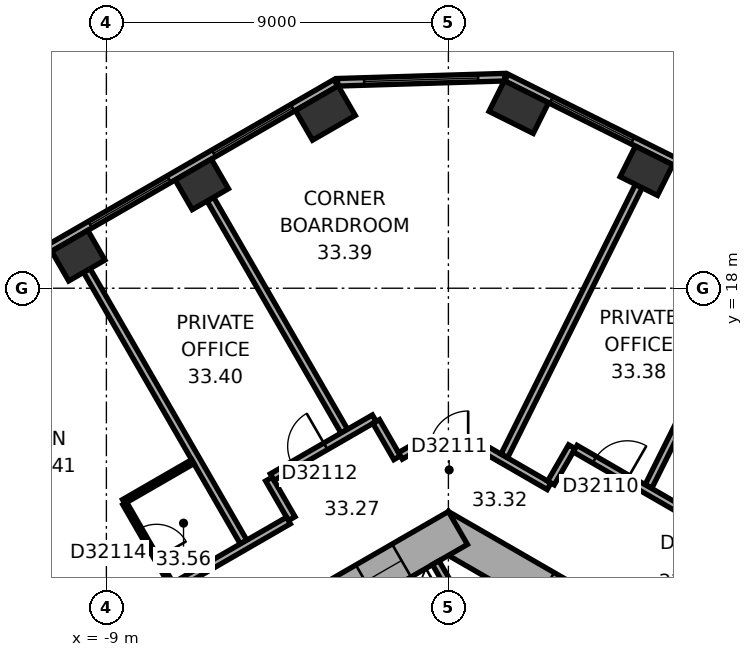
"""IFC4 building model, lengths in metres.
Left out: names, types, materials, properties, quantities, classifications, styles, units other than length and angle.
Written with IfcOpenShell. Run it as: python <this file> out.ifc"""

import sys

from ifc_helpers import new_model, si_unit, direction, frame, frame_2d, origin, origin_2d, place, context, subcontext, project, spatial, rectangle, extrude, element, fill, save


model = new_model("IFC4")
c1 = context("Model", 3, precision=1e-05, world=origin(), true_north=direction((0.0, 1.0)))
c2 = subcontext(c1, "Body", "Model", "MODEL_VIEW")
j1 = project(units=[si_unit("LENGTHUNIT", "METRE"), si_unit("PLANEANGLEUNIT", "RADIAN")], contexts=[c1])
p1 = place(None, origin())
s1 = spatial("IfcSite", under=j1, at=p1, CompositionType="ELEMENT")
p2 = place(p1, origin())
s2 = spatial("IfcBuilding", under=s1, at=p2, CompositionType="ELEMENT")
p3 = place(p2, frame((0.0, 0.0, 135.5)))
s3 = spatial("IfcBuildingStorey", under=s2, at=p3, CompositionType="ELEMENT", Elevation=135.5)
p4 = place(p3, frame((5.211, 21.091, 0.0), z_axis=(0.0, 0.0, 1.0), x_axis=(-0.894934361602, 0.44619781311, 0.0)))
e1 = element("IfcColumn", 1, at=p4, inside=s3, PredefinedType="COLUMN", context=c2, shape_type="SweptSolid", body=[
    extrude(rectangle(XDim=1.1, YDim=0.9, at=origin_2d()), origin(), (0.0, 0.0, 1.0), 3.7),
])
for number, where, z_axis, x_axis in (
    (2, (1.852, 22.766, 0.0), (0.0, 0.0, 1.0), (-0.895, 0.446, 0.0)),
    (3, (-3.238, 22.61, 0.0), (0.0, 0.0, 1.0), (-0.866, -0.5, 0.0)),
):
    element("IfcColumn", number, at=place(p3, frame(where, z_axis=z_axis, x_axis=x_axis)), inside=s3, PredefinedType="COLUMN", context=c2, shape_type="SweptSolid", body=[
        extrude(rectangle(XDim=1.3, YDim=0.9, at=origin_2d()), origin(), (0.0, 0.0, 1.0), 3.7),
    ])
for number, where, z_axis, x_axis in (
    (4, (-6.489, 20.733, 0.0), (0.0, 0.0, 1.0), (-0.866, -0.5, 0.0)),
    (5, (-9.74, 18.856, 0.0), (0.0, 0.0, 1.0), (-0.866, -0.5, 0.0)),
):
    element("IfcColumn", number, at=place(p3, frame(where, z_axis=z_axis, x_axis=x_axis)), inside=s3, PredefinedType="COLUMN", context=c2, shape_type="SweptSolid", body=[
        extrude(rectangle(XDim=1.1, YDim=0.9, at=origin_2d()), origin(), (0.0, 0.0, 1.0), 3.7),
    ])
p5 = place(p3, frame((10.25, 5.629, 0.0), z_axis=(0.0, 0.0, 1.0), x_axis=(-0.866022616891, 0.50000482701, 0.0)))
e6 = element("IfcWall", 6, at=p5, inside=s3, PredefinedType="SHEAR", context=c2, shape_type="SweptSolid", body=[
    extrude(rectangle(XDim=12.125, YDim=1.0, at=frame_2d((6.062, 0.0))), origin(), (0.0, 0.0, 1.0), 3.7),
])
p6 = place(p5, frame((2.612, 0.0, 0.0)))
e7 = element("IfcOpeningElement", 7, at=p6, cuts=e6, PredefinedType="OPENING", context=c2, shape_type="SweptSolid", body=[
    extrude(rectangle(XDim=1.1, YDim=2.1, at=frame_2d((0.55, 1.05))), frame((0.0, 0.51, 0.0), z_axis=(0.0, -1.0, 0.0), x_axis=(1.0, 0.0, 0.0)), (0.0, 0.0, 1.0), 1.02),
])
p7 = place(p5, frame((5.212, 0.0, 0.0)))
e8 = element("IfcOpeningElement", 8, at=p7, cuts=e6, PredefinedType="OPENING", context=c2, shape_type="SweptSolid", body=[
    extrude(rectangle(XDim=1.1, YDim=2.1, at=frame_2d((0.55, 1.05))), frame((0.0, 0.51, 0.0), z_axis=(0.0, -1.0, 0.0), x_axis=(1.0, 0.0, 0.0)), (0.0, 0.0, 1.0), 1.02),
])
p8 = place(p5, frame((7.812, 0.0, 0.0)))
e9 = element("IfcOpeningElement", 9, at=p8, cuts=e6, PredefinedType="OPENING", context=c2, shape_type="SweptSolid", body=[
    extrude(rectangle(XDim=1.1, YDim=2.1, at=frame_2d((0.55, 1.05))), frame((0.0, 0.51, 0.0), z_axis=(0.0, -1.0, 0.0), x_axis=(1.0, 0.0, 0.0)), (0.0, 0.0, 1.0), 1.02),
])
p9 = place(p3, frame((0.25, 11.691, 0.0), z_axis=(0.0, 0.0, 1.0), x_axis=(-0.866022616891, -0.50000482701, 0.0)))
e10 = element("IfcWall", 10, at=p9, inside=s3, PredefinedType="SHEAR", context=c2, shape_type="SweptSolid", body=[
    extrude(rectangle(XDim=12.125, YDim=1.0, at=frame_2d((6.062, 0.0))), origin(), (0.0, 0.0, 1.0), 3.7),
])
p10 = place(p9, frame((6.262, 0.0, 0.0)))
e11 = element("IfcOpeningElement", 11, at=p10, cuts=e10, PredefinedType="OPENING", context=c2, shape_type="SweptSolid", body=[
    extrude(rectangle(XDim=1.5, YDim=2.1, at=frame_2d((0.75, 1.05))), frame((0.0, 0.51, 0.0), z_axis=(0.0, -1.0, 0.0), x_axis=(1.0, 0.0, 0.0)), (0.0, 0.0, 1.0), 1.02),
])
p11 = place(p9, frame((1.712, 0.0, 0.0)))
e12 = element("IfcOpeningElement", 12, at=p11, cuts=e10, PredefinedType="OPENING", context=c2, shape_type="SweptSolid", body=[
    extrude(rectangle(XDim=1.1, YDim=2.1, at=frame_2d((0.55, 1.05))), frame((0.0, 0.51, 0.0), z_axis=(0.0, -1.0, 0.0), x_axis=(1.0, 0.0, 0.0)), (0.0, 0.0, 1.0), 1.02),
])
p12 = place(p3, frame((19.464, 14.599, 0.0), z_axis=(0.0, 0.0, 1.0), x_axis=(-0.894935755043, 0.446195018289, 0.0)))
e13 = element("IfcWall", 13, at=p12, inside=s3, PredefinedType="STANDARD", context=c2, shape_type="SweptSolid", body=[
    extrude(rectangle(XDim=20.044, YDim=0.2, at=frame_2d((10.022, 0.0))), origin(), (0.0, 0.0, 1.0), 3.7),
])
p13 = place(p12, frame((1.313, 0.0, 0.9)))
e14 = element("IfcOpeningElement", 14, at=p13, cuts=e13, PredefinedType="OPENING", context=c2, shape_type="SweptSolid", body=[
    extrude(rectangle(XDim=2.4, YDim=2.0, at=frame_2d((1.2, 1.0))), frame((0.0, 0.11, 0.0), z_axis=(0.0, -1.0, 0.0), x_axis=(1.0, 0.0, 0.0)), (0.0, 0.0, 1.0), 0.22),
])
p14 = place(p12, frame((5.067, 0.0, 0.9)))
e15 = element("IfcOpeningElement", 15, at=p14, cuts=e13, PredefinedType="OPENING", context=c2, shape_type="SweptSolid", body=[
    extrude(rectangle(XDim=2.4, YDim=2.0, at=frame_2d((1.2, 1.0))), frame((0.0, 0.11, 0.0), z_axis=(0.0, -1.0, 0.0), x_axis=(1.0, 0.0, 0.0)), (0.0, 0.0, 1.0), 0.22),
])
p15 = place(p12, frame((8.821, 0.0, 0.9)))
e16 = element("IfcOpeningElement", 16, at=p15, cuts=e13, PredefinedType="OPENING", context=c2, shape_type="SweptSolid", body=[
    extrude(rectangle(XDim=2.4, YDim=2.0, at=frame_2d((1.2, 1.0))), frame((0.0, 0.11, 0.0), z_axis=(0.0, -1.0, 0.0), x_axis=(1.0, 0.0, 0.0)), (0.0, 0.0, 1.0), 0.22),
])
p16 = place(p12, frame((12.575, 0.0, 0.9)))
e17 = element("IfcOpeningElement", 17, at=p16, cuts=e13, PredefinedType="OPENING", context=c2, shape_type="SweptSolid", body=[
    extrude(rectangle(XDim=2.4, YDim=2.0, at=frame_2d((1.2, 1.0))), frame((0.0, 0.11, 0.0), z_axis=(0.0, -1.0, 0.0), x_axis=(1.0, 0.0, 0.0)), (0.0, 0.0, 1.0), 0.22),
])
p17 = place(p12, frame((16.329, 0.0, 0.9)))
e18 = element("IfcOpeningElement", 18, at=p17, cuts=e13, PredefinedType="OPENING", context=c2, shape_type="SweptSolid", body=[
    extrude(rectangle(XDim=2.4, YDim=2.0, at=frame_2d((1.2, 1.0))), frame((0.0, 0.11, 0.0), z_axis=(0.0, -1.0, 0.0), x_axis=(1.0, 0.0, 0.0)), (0.0, 0.0, 1.0), 0.22),
])
p18 = place(p3, frame((1.479, 23.553, 0.0), z_axis=(0.0, 0.0, 1.0), x_axis=(-0.999534786117, -0.03049936625, 0.0)))
e19 = element("IfcWall", 19, at=p18, inside=s3, PredefinedType="STANDARD", context=c2, shape_type="SweptSolid", body=[
    extrude(rectangle(XDim=4.395, YDim=0.2, at=frame_2d((2.197, 0.0))), origin(), (0.0, 0.0, 1.0), 3.7),
])
p19 = place(p18, frame((0.698, 0.0, 0.9)))
e20 = element("IfcOpeningElement", 20, at=p19, cuts=e19, PredefinedType="OPENING", context=c2, shape_type="SweptSolid", body=[
    extrude(rectangle(XDim=3.0, YDim=2.0, at=frame_2d((1.5, 1.0))), frame((0.0, 0.11, 0.0), z_axis=(0.0, -1.0, 0.0), x_axis=(1.0, 0.0, 0.0)), (0.0, 0.0, 1.0), 0.22),
])
p20 = place(p3, frame((-2.961, 23.405, 0.0), z_axis=(0.0, 0.0, 1.0), x_axis=(-0.866023315909, -0.500003616288, 0.0)))
e21 = element("IfcWall", 21, at=p20, inside=s3, PredefinedType="STANDARD", context=c2, shape_type="SweptSolid", body=[
    extrude(rectangle(XDim=20.044, YDim=0.2, at=frame_2d((10.022, 0.0))), origin(), (0.0, 0.0, 1.0), 3.7),
])
p21 = place(p20, frame((1.314, 0.0, 0.9)))
e22 = element("IfcOpeningElement", 22, at=p21, cuts=e21, PredefinedType="OPENING", context=c2, shape_type="SweptSolid", body=[
    extrude(rectangle(XDim=2.4, YDim=2.0, at=frame_2d((1.2, 1.0))), frame((0.0, 0.11, 0.0), z_axis=(0.0, -1.0, 0.0), x_axis=(1.0, 0.0, 0.0)), (0.0, 0.0, 1.0), 0.22),
])
p22 = place(p20, frame((5.069, 0.0, 0.9)))
e23 = element("IfcOpeningElement", 23, at=p22, cuts=e21, PredefinedType="OPENING", context=c2, shape_type="SweptSolid", body=[
    extrude(rectangle(XDim=2.4, YDim=2.0, at=frame_2d((1.2, 1.0))), frame((0.0, 0.11, 0.0), z_axis=(0.0, -1.0, 0.0), x_axis=(1.0, 0.0, 0.0)), (0.0, 0.0, 1.0), 0.22),
])
p23 = place(p20, frame((8.823, 0.0, 0.9)))
e24 = element("IfcOpeningElement", 24, at=p23, cuts=e21, PredefinedType="OPENING", context=c2, shape_type="SweptSolid", body=[
    extrude(rectangle(XDim=2.4, YDim=2.0, at=frame_2d((1.2, 1.0))), frame((0.0, 0.11, 0.0), z_axis=(0.0, -1.0, 0.0), x_axis=(1.0, 0.0, 0.0)), (0.0, 0.0, 1.0), 0.22),
])
p24 = place(p20, frame((12.577, 0.0, 0.9)))
e25 = element("IfcOpeningElement", 25, at=p24, cuts=e21, PredefinedType="OPENING", context=c2, shape_type="SweptSolid", body=[
    extrude(rectangle(XDim=2.4, YDim=2.0, at=frame_2d((1.2, 1.0))), frame((0.0, 0.11, 0.0), z_axis=(0.0, -1.0, 0.0), x_axis=(1.0, 0.0, 0.0)), (0.0, 0.0, 1.0), 0.22),
])
p25 = place(p20, frame((16.331, 0.0, 0.9)))
e26 = element("IfcOpeningElement", 26, at=p25, cuts=e21, PredefinedType="OPENING", context=c2, shape_type="SweptSolid", body=[
    extrude(rectangle(XDim=2.4, YDim=2.0, at=frame_2d((1.2, 1.0))), frame((0.0, 0.11, 0.0), z_axis=(0.0, -1.0, 0.0), x_axis=(1.0, 0.0, 0.0)), (0.0, 0.0, 1.0), 0.22),
])
p26 = place(p3, frame((0.767, 8.872, 0.0), z_axis=(0.0, 0.0, 1.0), x_axis=(-0.499994660107, 0.866028486751, 0.0)))
e27 = element("IfcWall", 27, at=p26, inside=s3, PredefinedType="PARTITIONING", context=c2, shape_type="SweptSolid", body=[
    extrude(rectangle(XDim=2.2, YDim=0.2, at=frame_2d((1.1, 0.0))), origin(), (0.0, 0.0, 1.0), 3.35),
])
p27 = place(p3, frame((-9.515, 18.466, 0.0), z_axis=(0.0, 0.0, 1.0), x_axis=(0.500009360108, -0.866019999656, 0.0)))
e28 = element("IfcWall", 28, at=p27, inside=s3, PredefinedType="PARTITIONING", context=c2, shape_type="SweptSolid", body=[
    extrude(rectangle(XDim=8.25, YDim=0.2, at=frame_2d((4.125, 0.0))), origin(), (0.0, 0.0, 1.0), 2.55),
])
p28 = place(p3, frame((-8.545, 12.387, 0.0), z_axis=(0.0, 0.0, 1.0), x_axis=(0.866009402589, 0.500027713859, 0.0)))
e29 = element("IfcWall", 29, at=p28, inside=s3, PredefinedType="PARTITIONING", context=c2, shape_type="SweptSolid", body=[
    extrude(rectangle(XDim=2.1, YDim=0.12, at=frame_2d((1.05, 0.0))), origin(), (0.0, 0.0, 1.0), 3.35),
])
p29 = place(p3, frame((-7.295, 10.222, 0.0), z_axis=(0.0, 0.0, 1.0), x_axis=(-0.500002508028, 0.866023955769, 0.0)))
e30 = element("IfcWall", 30, at=p29, inside=s3, PredefinedType="PARTITIONING", context=c2, shape_type="SweptSolid", body=[
    extrude(rectangle(XDim=2.44, YDim=0.12, at=frame_2d((1.22, 0.0))), origin(), (0.0, 0.0, 1.0), 3.35),
])
p30 = place(p29, frame((0.77, 0.0, 0.0)))
e31 = element("IfcOpeningElement", 31, at=p30, cuts=e30, PredefinedType="OPENING", context=c2, shape_type="SweptSolid", body=[
    extrude(rectangle(XDim=0.9, YDim=2.1, at=frame_2d((0.45, 1.05))), frame((0.0, 0.07, 0.0), z_axis=(0.0, -1.0, 0.0), x_axis=(1.0, 0.0, 0.0)), (0.0, 0.0, 1.0), 0.14),
])
p31 = place(p3, frame((-6.264, 20.344, 0.0), z_axis=(0.0, 0.0, 1.0), x_axis=(0.500009260695, -0.866020057054, 0.0)))
e32 = element("IfcWall", 32, at=p31, inside=s3, PredefinedType="PARTITIONING", context=c2, shape_type="SweptSolid", body=[
    extrude(rectangle(XDim=7.049, YDim=0.2, at=frame_2d((3.524, 0.0))), origin(), (0.0, 0.0, 1.0), 3.35),
])
p32 = place(p3, frame((-4.723, 12.978, 0.0), z_axis=(0.0, 0.0, 1.0), x_axis=(0.500074377092, -0.865982457891, 0.0)))
e33 = element("IfcWall", 33, at=p32, inside=s3, PredefinedType="PARTITIONING", context=c2, shape_type="SweptSolid", body=[
    extrude(rectangle(XDim=1.201, YDim=0.2, at=frame_2d((0.601, 0.0))), origin(), (0.0, 0.0, 1.0), 3.35),
])
p33 = place(p3, frame((-4.209, 11.888, 0.0), z_axis=(0.0, 0.0, 1.0), x_axis=(-0.866020930448, -0.500007747966, 0.0)))
e34 = element("IfcWall", 34, at=p33, inside=s3, PredefinedType="PARTITIONING", context=c2, shape_type="SweptSolid", body=[
    extrude(rectangle(XDim=8.321, YDim=0.2, at=frame_2d((4.161, 0.0))), origin(), (0.0, 0.0, 1.0), 3.35),
])
p34 = place(p33, frame((5.439, 0.0, 0.0)))
e35 = element("IfcOpeningElement", 35, at=p34, cuts=e34, PredefinedType="OPENING", context=c2, shape_type="SweptSolid", body=[
    extrude(rectangle(XDim=1.0, YDim=2.1, at=frame_2d((0.5, 1.05))), frame((0.0, 0.11, 0.0), z_axis=(0.0, -1.0, 0.0), x_axis=(1.0, 0.0, 0.0)), (0.0, 0.0, 1.0), 0.22),
])
p35 = place(p3, frame((-1.95, 14.579, 0.0), z_axis=(0.0, 0.0, 1.0), x_axis=(-0.866011260204, -0.500024496599, 0.0)))
e36 = element("IfcWall", 36, at=p35, inside=s3, PredefinedType="PARTITIONING", context=c2, shape_type="SweptSolid", body=[
    extrude(rectangle(XDim=3.102, YDim=0.2, at=frame_2d((1.551, 0.0))), origin(), (0.0, 0.0, 1.0), 3.35),
])
p36 = place(p35, frame((1.478, 0.0, 0.0)))
e37 = element("IfcOpeningElement", 37, at=p36, cuts=e36, PredefinedType="OPENING", context=c2, shape_type="SweptSolid", body=[
    extrude(rectangle(XDim=1.0, YDim=2.1, at=frame_2d((0.5, 1.05))), frame((0.0, 0.11, 0.0), z_axis=(0.0, -1.0, 0.0), x_axis=(1.0, 0.0, 0.0)), (0.0, 0.0, 1.0), 0.22),
])
p37 = place(p3, frame((-1.349, 13.539, 0.0), z_axis=(0.0, 0.0, 1.0), x_axis=(-0.500074377092, 0.865982457891, 0.0)))
e38 = element("IfcWall", 38, at=p37, inside=s3, PredefinedType="PARTITIONING", context=c2, shape_type="SweptSolid", body=[
    extrude(rectangle(XDim=1.101, YDim=0.2, at=frame_2d((0.55, 0.0))), origin(), (0.0, 0.0, 1.0), 3.35),
])
p38 = place(p3, frame((-0.95, 13.77, 0.0), z_axis=(0.0, 0.0, 1.0), x_axis=(-0.865904111586, -0.500210025428, 0.0)))
e39 = element("IfcWall", 39, at=p38, inside=s3, PredefinedType="PARTITIONING", context=c2, shape_type="SweptSolid", body=[
    extrude(rectangle(XDim=0.361, YDim=0.2, at=frame_2d((0.181, 0.0))), origin(), (0.0, 0.0, 1.0), 3.35),
])
p39 = place(p3, frame((0.95, 13.77, 0.0), z_axis=(0.0, 0.0, 1.0), x_axis=(-1.0, 0.0, 0.0)))
e40 = element("IfcWall", 40, at=p39, inside=s3, PredefinedType="PARTITIONING", context=c2, shape_type="SweptSolid", body=[
    extrude(rectangle(XDim=1.86, YDim=0.2, at=frame_2d((0.93, 0.0))), origin(), (0.0, 0.0, 1.0), 3.35),
])
p40 = place(p39, frame((0.43, 0.0, 0.0)))
e41 = element("IfcOpeningElement", 41, at=p40, cuts=e40, PredefinedType="OPENING", context=c2, shape_type="SweptSolid", body=[
    extrude(rectangle(XDim=1.0, YDim=2.1, at=frame_2d((0.5, 1.05))), frame((0.0, 0.11, 0.0), z_axis=(0.0, -1.0, 0.0), x_axis=(1.0, 0.0, 0.0)), (0.0, 0.0, 1.0), 0.22),
])
p41 = place(p3, frame((2.648, 12.789, 0.0), z_axis=(0.0, 0.0, 1.0), x_axis=(-0.8660607342, 0.499938800931, 0.0)))
e42 = element("IfcWall", 42, at=p41, inside=s3, PredefinedType="PARTITIONING", context=c2, shape_type="SweptSolid", body=[
    extrude(rectangle(XDim=1.921, YDim=0.2, at=frame_2d((0.96, 0.0))), origin(), (0.0, 0.0, 1.0), 3.35),
])
p42 = place(p3, frame((3.249, 13.829, 0.0), z_axis=(0.0, 0.0, 1.0), x_axis=(-0.499812034598, -0.866133898465, 0.0)))
e43 = element("IfcWall", 43, at=p42, inside=s3, PredefinedType="PARTITIONING", context=c2, shape_type="SweptSolid", body=[
    extrude(rectangle(XDim=1.101, YDim=0.2, at=frame_2d((0.551, 0.0))), origin(), (0.0, 0.0, 1.0), 3.35),
])
p43 = place(p3, frame((5.01, 20.688, 0.0), z_axis=(0.0, 0.0, 1.0), x_axis=(-0.446203062394, -0.894931744386, 0.0)))
e44 = element("IfcWall", 44, at=p43, inside=s3, PredefinedType="PARTITIONING", context=c2, shape_type="SweptSolid", body=[
    extrude(rectangle(XDim=7.927, YDim=0.2, at=frame_2d((3.963, 0.0))), origin(), (0.0, 0.0, 1.0), 2.55),
])
p44 = place(p3, frame((8.37, 19.013, 0.0), z_axis=(0.0, 0.0, 1.0), x_axis=(-0.446187985757, -0.894939261272, 0.0)))
e45 = element("IfcWall", 45, at=p44, inside=s3, PredefinedType="PARTITIONING", context=c2, shape_type="SweptSolid", body=[
    extrude(rectangle(XDim=6.953, YDim=0.2, at=frame_2d((3.477, 0.0))), origin(), (0.0, 0.0, 1.0), 3.35),
])
p45 = place(p3, frame((11.646, 8.981, 0.0), z_axis=(0.0, 0.0, 1.0), x_axis=(-0.866027142779, 0.499996987961, 0.0)))
e46 = element("IfcWall", 46, at=p45, inside=s3, PredefinedType="PARTITIONING", context=c2, shape_type="SweptSolid", body=[
    extrude(rectangle(XDim=9.597, YDim=0.2, at=frame_2d((4.798, 0.0))), origin(), (0.0, 0.0, 1.0), 3.35),
])
p46 = place(p45, frame((1.331, 0.0, 0.0)))
e47 = element("IfcOpeningElement", 47, at=p46, cuts=e46, PredefinedType="OPENING", context=c2, shape_type="SweptSolid", body=[
    extrude(rectangle(XDim=1.0, YDim=2.1, at=frame_2d((0.5, 1.05))), frame((0.0, 0.11, 0.0), z_axis=(0.0, -1.0, 0.0), x_axis=(1.0, 0.0, 0.0)), (0.0, 0.0, 1.0), 0.22),
])
p47 = place(p45, frame((5.042, 0.0, 0.0)))
e48 = element("IfcOpeningElement", 48, at=p47, cuts=e46, PredefinedType="OPENING", context=c2, shape_type="SweptSolid", body=[
    extrude(rectangle(XDim=1.0, YDim=2.1, at=frame_2d((0.5, 1.05))), frame((0.0, 0.11, 0.0), z_axis=(0.0, -1.0, 0.0), x_axis=(1.0, 0.0, 0.0)), (0.0, 0.0, 1.0), 0.22),
])
p48 = place(p45, frame((8.01, 0.0, 0.0)))
e49 = element("IfcOpeningElement", 49, at=p48, cuts=e46, PredefinedType="OPENING", context=c2, shape_type="SweptSolid", body=[
    extrude(rectangle(XDim=1.0, YDim=2.1, at=frame_2d((0.5, 1.05))), frame((0.0, 0.11, 0.0), z_axis=(0.0, -1.0, 0.0), x_axis=(1.0, 0.0, 0.0)), (0.0, 0.0, 1.0), 0.22),
])
p49 = place(p17, origin())
e50 = element("IfcWindow", 50, at=p49, inside=s3, PartitioningType="SINGLE_PANEL", PredefinedType="WINDOW", context=c2, shape_type="SweptSolid", body=[
    extrude(rectangle(XDim=2.4, YDim=2.0, at=frame_2d((1.2, 1.0))), frame((0.0, 0.03, 0.0), z_axis=(0.0, -1.0, 0.0), x_axis=(1.0, 0.0, 0.0)), (0.0, 0.0, 1.0), 0.06),
])
fill(e18, e50)
p50 = place(p19, origin())
e51 = element("IfcWindow", 51, at=p50, inside=s3, PartitioningType="SINGLE_PANEL", PredefinedType="WINDOW", context=c2, shape_type="SweptSolid", body=[
    extrude(rectangle(XDim=3.0, YDim=2.0, at=frame_2d((1.5, 1.0))), frame((0.0, 0.03, 0.0), z_axis=(0.0, -1.0, 0.0), x_axis=(1.0, 0.0, 0.0)), (0.0, 0.0, 1.0), 0.06),
])
fill(e20, e51)
p51 = place(p21, origin())
e52 = element("IfcWindow", 52, at=p51, inside=s3, PartitioningType="SINGLE_PANEL", PredefinedType="WINDOW", context=c2, shape_type="SweptSolid", body=[
    extrude(rectangle(XDim=2.4, YDim=2.0, at=frame_2d((1.2, 1.0))), frame((0.0, 0.03, 0.0), z_axis=(0.0, -1.0, 0.0), x_axis=(1.0, 0.0, 0.0)), (0.0, 0.0, 1.0), 0.06),
])
fill(e22, e52)
p52 = place(p22, origin())
e53 = element("IfcWindow", 53, at=p52, inside=s3, PartitioningType="SINGLE_PANEL", PredefinedType="WINDOW", context=c2, shape_type="SweptSolid", body=[
    extrude(rectangle(XDim=2.4, YDim=2.0, at=frame_2d((1.2, 1.0))), frame((0.0, 0.03, 0.0), z_axis=(0.0, -1.0, 0.0), x_axis=(1.0, 0.0, 0.0)), (0.0, 0.0, 1.0), 0.06),
])
fill(e23, e53)
p53 = place(p11, origin())
e54 = element("IfcDoor", 54, at=p53, inside=s3, OperationType="DOUBLE_DOOR_SLIDING", PredefinedType="DOOR", context=c2, shape_type="SweptSolid", body=[
    extrude(rectangle(XDim=1.1, YDim=2.1, at=frame_2d((0.55, 1.05))), frame((0.0, 0.025, 0.0), z_axis=(0.0, -1.0, 0.0), x_axis=(1.0, 0.0, 0.0)), (0.0, 0.0, 1.0), 0.05),
])
fill(e12, e54)
p54 = place(p48, origin())
e55 = element("IfcDoor", 55, at=p54, inside=s3, OperationType="SINGLE_SWING_LEFT", PredefinedType="DOOR", context=c2, shape_type="SweptSolid", body=[
    extrude(rectangle(XDim=1.0, YDim=2.1, at=frame_2d((0.5, 1.05))), frame((0.0, 0.025, 0.0), z_axis=(0.0, -1.0, 0.0), x_axis=(1.0, 0.0, 0.0)), (0.0, 0.0, 1.0), 0.05),
])
fill(e49, e55)
p55 = place(p40, origin())
e56 = element("IfcDoor", 56, at=p55, inside=s3, OperationType="SINGLE_SWING_LEFT", PredefinedType="DOOR", context=c2, shape_type="SweptSolid", body=[
    extrude(rectangle(XDim=1.0, YDim=2.1, at=frame_2d((0.5, 1.05))), frame((0.0, 0.025, 0.0), z_axis=(0.0, -1.0, 0.0), x_axis=(1.0, 0.0, 0.0)), (0.0, 0.0, 1.0), 0.05),
])
fill(e41, e56)
p56 = place(p36, origin())
e57 = element("IfcDoor", 57, at=p56, inside=s3, OperationType="SINGLE_SWING_LEFT", PredefinedType="DOOR", context=c2, shape_type="SweptSolid", body=[
    extrude(rectangle(XDim=1.0, YDim=2.1, at=frame_2d((0.5, 1.05))), frame((0.0, 0.025, 0.0), z_axis=(0.0, -1.0, 0.0), x_axis=(1.0, 0.0, 0.0)), (0.0, 0.0, 1.0), 0.05),
])
fill(e37, e57)
p57 = place(p30, origin())
e58 = element("IfcDoor", 58, at=p57, inside=s3, OperationType="SINGLE_SWING_LEFT", PredefinedType="DOOR", context=c2, shape_type="SweptSolid", body=[
    extrude(rectangle(XDim=0.9, YDim=2.1, at=frame_2d((0.45, 1.05))), frame((0.0, 0.025, 0.0), z_axis=(0.0, -1.0, 0.0), x_axis=(1.0, 0.0, 0.0)), (0.0, 0.0, 1.0), 0.05),
])
fill(e31, e58)
save(model, sys.argv[1])
